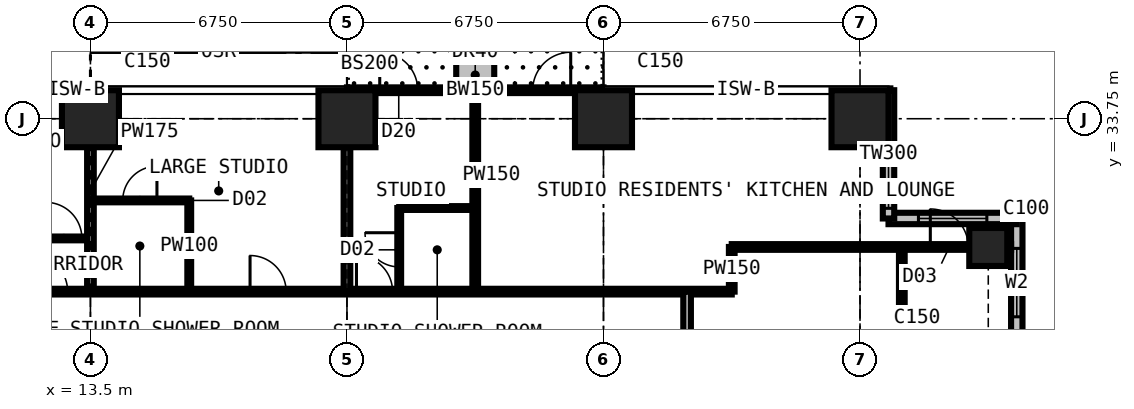
"""IFC4 building model, lengths in metres.
Left out: names, types, materials, properties, quantities, classifications, styles, units other than length and angle.
Written with IfcOpenShell. Run it as: python <this file> out.ifc"""

import sys

from ifc_helpers import new_model, si_unit, direction, frame, frame_2d, origin, origin_2d, place, context, subcontext, project, spatial, rectangle, extrude, element, fill, save


model = new_model("IFC4")
c1 = context("Model", 3, precision=1e-05, world=origin(), true_north=direction((0.0, 1.0)))
c2 = subcontext(c1, "Body", "Model", "MODEL_VIEW")
j1 = project(units=[si_unit("LENGTHUNIT", "METRE"), si_unit("PLANEANGLEUNIT", "RADIAN")], contexts=[c1])
p1 = place(None, origin())
s1 = spatial("IfcSite", under=j1, at=p1, CompositionType="ELEMENT")
p2 = place(p1, origin())
s2 = spatial("IfcBuilding", under=s1, at=p2, CompositionType="ELEMENT")
p3 = place(p2, frame((0.0, 0.0, 126.9)))
s3 = spatial("IfcBuildingStorey", under=s2, at=p3, CompositionType="ELEMENT", Elevation=126.9)
for number, where, z_axis, x_axis in (
    (1, (13.5, 33.75, 0.0), (0.0, 0.0, 1.0), (1.0, 0.0, 0.0)),
    (2, (20.25, 33.75, 0.0), (0.0, 0.0, 1.0), (1.0, 0.0, 0.0)),
    (3, (27.0, 33.75, 0.0), (0.0, 0.0, 1.0), (1.0, 0.0, 0.0)),
    (4, (33.75, 33.75, 0.0), (0.0, 0.0, 1.0), (1.0, 0.0, 0.0)),
):
    element("IfcColumn", number, at=place(p3, frame(where, z_axis=z_axis, x_axis=x_axis)), inside=s3, PredefinedType="COLUMN", context=c2, shape_type="SweptSolid", body=[
        extrude(rectangle(XDim=1.5, YDim=1.5, at=origin_2d()), origin(), (0.0, 0.0, 1.0), 3.6),
    ])
p4 = place(p3, frame((37.125, 30.375, 0.0), z_axis=(0.0, 0.0, 1.0), x_axis=(1.0, 0.0, 0.0)))
e5 = element("IfcColumn", 5, at=p4, inside=s3, PredefinedType="COLUMN", context=c2, shape_type="SweptSolid", body=[
    extrude(rectangle(XDim=1.0, YDim=1.0, at=origin_2d()), origin(), (0.0, 0.0, 1.0), 3.6),
])
p5 = place(p3, frame((37.875, 27.75, 0.0), z_axis=(0.0, 0.0, 1.0), x_axis=(0.0, 1.0, 0.0)))
e6 = element("IfcWall", 6, at=p5, inside=s3, PredefinedType="SOLIDWALL", context=c2, shape_type="SweptSolid", body=[
    extrude(rectangle(XDim=3.375, YDim=0.3, at=frame_2d((1.688, 0.0))), origin(), (0.0, 0.0, 1.0), 3.375),
])
p6 = place(p5, frame((0.788, 0.0, 0.6)))
e7 = element("IfcOpeningElement", 7, at=p6, cuts=e6, PredefinedType="OPENING", context=c2, shape_type="SweptSolid", body=[
    extrude(rectangle(XDim=1.8, YDim=2.1, at=frame_2d((0.9, 1.05))), frame((0.0, 0.16, 0.0), z_axis=(0.0, -1.0, 0.0), x_axis=(1.0, 0.0, 0.0)), (0.0, 0.0, 1.0), 0.32),
])
p7 = place(p3, frame((37.875, 31.125, 0.0), z_axis=(0.0, 0.0, 1.0), x_axis=(-1.0, 0.0, 0.0)))
e8 = element("IfcWall", 8, at=p7, inside=s3, PredefinedType="SOLIDWALL", context=c2, shape_type="SweptSolid", body=[
    extrude(rectangle(XDim=3.375, YDim=0.3, at=frame_2d((1.688, 0.0))), origin(), (0.0, 0.0, 1.0), 3.375),
])
p8 = place(p7, frame((0.788, 0.0, 0.6)))
e9 = element("IfcOpeningElement", 9, at=p8, cuts=e8, PredefinedType="OPENING", context=c2, shape_type="SweptSolid", body=[
    extrude(rectangle(XDim=1.8, YDim=2.1, at=frame_2d((0.9, 1.05))), frame((0.0, 0.16, 0.0), z_axis=(0.0, -1.0, 0.0), x_axis=(1.0, 0.0, 0.0)), (0.0, 0.0, 1.0), 0.32),
])
p9 = place(p3, frame((34.5, 31.125, 0.0), z_axis=(0.0, 0.0, 1.0), x_axis=(0.0, 1.0, 0.0)))
e10 = element("IfcWall", 10, at=p9, inside=s3, PredefinedType="SOLIDWALL", context=c2, shape_type="SweptSolid", body=[
    extrude(rectangle(XDim=3.375, YDim=0.3, at=frame_2d((1.688, 0.0))), origin(), (0.0, 0.0, 1.0), 3.375),
])
p10 = place(p9, frame((0.268, 0.0, 0.9)))
e11 = element("IfcOpeningElement", 11, at=p10, cuts=e10, PredefinedType="OPENING", context=c2, shape_type="SweptSolid", body=[
    extrude(rectangle(XDim=1.5, YDim=1.8, at=frame_2d((0.75, 0.9))), frame((0.0, 0.16, 0.0), z_axis=(0.0, -1.0, 0.0), x_axis=(1.0, 0.0, 0.0)), (0.0, 0.0, 1.0), 0.32),
])
p11 = place(p3, frame((20.25, 34.5, 0.0), z_axis=(0.0, 0.0, 1.0), x_axis=(1.0, 0.0, 0.0)))
e12 = element("IfcWall", 12, at=p11, inside=s3, PredefinedType="SOLIDWALL", context=c2, shape_type="SweptSolid", body=[
    extrude(rectangle(XDim=6.75, YDim=0.15, at=frame_2d((3.375, 0.0))), origin(), (0.0, 0.0, 1.0), 3.375),
])
p12 = place(p11, frame((0.863, 0.0, 0.0)))
e13 = element("IfcOpeningElement", 13, at=p12, cuts=e12, PredefinedType="OPENING", context=c2, shape_type="SweptSolid", body=[
    extrude(rectangle(XDim=1.0, YDim=2.2, at=frame_2d((0.5, 1.1))), frame((0.0, 0.085, 0.0), z_axis=(0.0, -1.0, 0.0), x_axis=(1.0, 0.0, 0.0)), (0.0, 0.0, 1.0), 0.17),
])
p13 = place(p11, frame((1.975, 0.0, 0.9)))
e14 = element("IfcOpeningElement", 14, at=p13, cuts=e12, PredefinedType="OPENING", context=c2, shape_type="SweptSolid", body=[
    extrude(rectangle(XDim=1.2, YDim=1.8, at=frame_2d((0.6, 0.9))), frame((0.0, 0.085, 0.0), z_axis=(0.0, -1.0, 0.0), x_axis=(1.0, 0.0, 0.0)), (0.0, 0.0, 1.0), 0.17),
])
p14 = place(p11, frame((4.887, 0.0, 0.0)))
e15 = element("IfcOpeningElement", 15, at=p14, cuts=e12, PredefinedType="OPENING", context=c2, shape_type="SweptSolid", body=[
    extrude(rectangle(XDim=1.0, YDim=2.2, at=frame_2d((0.5, 1.1))), frame((0.0, 0.085, 0.0), z_axis=(0.0, -1.0, 0.0), x_axis=(1.0, 0.0, 0.0)), (0.0, 0.0, 1.0), 0.17),
])
p15 = place(p11, frame((3.575, 0.0, 0.9)))
e16 = element("IfcOpeningElement", 16, at=p15, cuts=e12, PredefinedType="OPENING", context=c2, shape_type="SweptSolid", body=[
    extrude(rectangle(XDim=1.2, YDim=1.8, at=frame_2d((0.6, 0.9))), frame((0.0, 0.085, 0.0), z_axis=(0.0, -1.0, 0.0), x_axis=(1.0, 0.0, 0.0)), (0.0, 0.0, 1.0), 0.17),
])
p16 = place(p3, frame((23.625, 34.6, 0.0), z_axis=(0.0, 0.0, 1.0), x_axis=(0.0, 1.0, 0.0)))
e17 = element("IfcWall", 17, at=p16, inside=s3, PredefinedType="USERDEFINED", context=c2, shape_type="SweptSolid", body=[
    extrude(rectangle(XDim=2.2, YDim=1.0, at=frame_2d((1.1, 0.0))), origin(), (0.0, 0.0, 1.0), 0.9),
])
p17 = place(p3, frame((10.125, 30.6, 0.0), z_axis=(0.0, 0.0, 1.0), x_axis=(1.0, 0.0, 0.0)))
e18 = element("IfcWall", 18, at=p17, inside=s3, PredefinedType="PARTITIONING", context=c2, shape_type="SweptSolid", body=[
    extrude(rectangle(XDim=3.375, YDim=0.1, at=frame_2d((1.688, 0.0))), origin(), (0.0, 0.0, 1.0), 3.375),
])
p18 = place(p17, frame((2.2, 0.0, 0.0)))
e19 = element("IfcOpeningElement", 19, at=p18, cuts=e18, PredefinedType="OPENING", context=c2, shape_type="SweptSolid", body=[
    extrude(rectangle(XDim=0.95, YDim=2.2, at=frame_2d((0.475, 1.1))), frame((0.0, 0.06, 0.0), z_axis=(0.0, -1.0, 0.0), x_axis=(1.0, 0.0, 0.0)), (0.0, 0.0, 1.0), 0.12),
])
p19 = place(p3, frame((11.3, 29.2, 0.0), z_axis=(0.0, 0.0, 1.0), x_axis=(1.0, 0.0, 0.0)))
e20 = element("IfcWall", 20, at=p19, inside=s3, PredefinedType="PARTITIONING", context=c2, shape_type="SweptSolid", body=[
    extrude(rectangle(XDim=19.075, YDim=0.15, at=frame_2d((9.538, 0.0))), origin(), (0.0, 0.0, 1.0), 3.375),
])
p20 = place(p19, frame((6.4, 0.0, 0.0)))
e21 = element("IfcOpeningElement", 21, at=p20, cuts=e20, PredefinedType="OPENING", context=c2, shape_type="SweptSolid", body=[
    extrude(rectangle(XDim=0.95, YDim=2.2, at=frame_2d((0.475, 1.1))), frame((0.0, 0.085, 0.0), z_axis=(0.0, -1.0, 0.0), x_axis=(1.0, 0.0, 0.0)), (0.0, 0.0, 1.0), 0.17),
])
p21 = place(p19, frame((9.2, 0.0, 0.0)))
e22 = element("IfcOpeningElement", 22, at=p21, cuts=e20, PredefinedType="OPENING", context=c2, shape_type="SweptSolid", body=[
    extrude(rectangle(XDim=0.95, YDim=2.2, at=frame_2d((0.475, 1.1))), frame((0.0, 0.085, 0.0), z_axis=(0.0, -1.0, 0.0), x_axis=(1.0, 0.0, 0.0)), (0.0, 0.0, 1.0), 0.17),
])
p22 = place(p19, frame((0.6, 0.0, 0.0)))
e23 = element("IfcOpeningElement", 23, at=p22, cuts=e20, PredefinedType="OPENING", context=c2, shape_type="SweptSolid", body=[
    extrude(rectangle(XDim=1.0, YDim=2.2, at=frame_2d((0.5, 1.1))), frame((0.0, 0.085, 0.0), z_axis=(0.0, -1.0, 0.0), x_axis=(1.0, 0.0, 0.0)), (0.0, 0.0, 1.0), 0.17),
])
p23 = place(p3, frame((13.5, 29.2, 0.0), z_axis=(0.0, 0.0, 1.0), x_axis=(0.0, 1.0, 0.0)))
e24 = element("IfcWall", 24, at=p23, inside=s3, PredefinedType="PARTITIONING", context=c2, shape_type="SweptSolid", body=[
    extrude(rectangle(XDim=5.284, YDim=0.175, at=frame_2d((2.642, 0.0))), origin(), (0.0, 0.0, 1.0), 2.61),
])
p24 = place(p3, frame((13.5, 31.6, 0.0), z_axis=(0.0, 0.0, 1.0), x_axis=(1.0, 0.0, 0.0)))
e25 = element("IfcWall", 25, at=p24, inside=s3, PredefinedType="PARTITIONING", context=c2, shape_type="SweptSolid", body=[
    extrude(rectangle(XDim=2.6, YDim=0.1, at=frame_2d((1.3, 0.0))), origin(), (0.0, 0.0, 1.0), 3.375),
])
p25 = place(p24, frame((0.85, 0.0, 0.0)))
e26 = element("IfcOpeningElement", 26, at=p25, cuts=e25, PredefinedType="OPENING", context=c2, shape_type="SweptSolid", body=[
    extrude(rectangle(XDim=0.9, YDim=2.2, at=frame_2d((0.45, 1.1))), frame((0.0, 0.06, 0.0), z_axis=(0.0, -1.0, 0.0), x_axis=(1.0, 0.0, 0.0)), (0.0, 0.0, 1.0), 0.12),
])
p26 = place(p3, frame((16.1, 29.2, 0.0), z_axis=(0.0, 0.0, 1.0), x_axis=(0.0, 1.0, 0.0)))
e27 = element("IfcWall", 27, at=p26, inside=s3, PredefinedType="PARTITIONING", context=c2, shape_type="SweptSolid", body=[
    extrude(rectangle(XDim=2.4, YDim=0.1, at=frame_2d((1.2, 0.0))), origin(), (0.0, 0.0, 1.0), 3.375),
])
p27 = place(p3, frame((20.25, 29.2, 0.0), z_axis=(0.0, 0.0, 1.0), x_axis=(0.0, 1.0, 0.0)))
e28 = element("IfcWall", 28, at=p27, inside=s3, PredefinedType="PARTITIONING", context=c2, shape_type="SweptSolid", body=[
    extrude(rectangle(XDim=5.284, YDim=0.175, at=frame_2d((2.642, 0.0))), origin(), (0.0, 0.0, 1.0), 2.61),
])
p28 = place(p3, frame((21.625, 29.2, 0.0), z_axis=(0.0, 0.0, 1.0), x_axis=(0.0, 1.0, 0.0)))
e29 = element("IfcWall", 29, at=p28, inside=s3, PredefinedType="PARTITIONING", context=c2, shape_type="SweptSolid", body=[
    extrude(rectangle(XDim=2.2, YDim=0.1, at=frame_2d((1.1, 0.0))), origin(), (0.0, 0.0, 1.0), 3.375),
])
p29 = place(p28, frame((0.65, 0.0, 0.0)))
e30 = element("IfcOpeningElement", 30, at=p29, cuts=e29, PredefinedType="OPENING", context=c2, shape_type="SweptSolid", body=[
    extrude(rectangle(XDim=0.9, YDim=2.2, at=frame_2d((0.45, 1.1))), frame((0.0, 0.06, 0.0), z_axis=(0.0, -1.0, 0.0), x_axis=(1.0, 0.0, 0.0)), (0.0, 0.0, 1.0), 0.12),
])
p30 = place(p3, frame((21.625, 31.4, 0.0), z_axis=(0.0, 0.0, 1.0), x_axis=(1.0, 0.0, 0.0)))
e31 = element("IfcWall", 31, at=p30, inside=s3, PredefinedType="PARTITIONING", context=c2, shape_type="SweptSolid", body=[
    extrude(rectangle(XDim=2.0, YDim=0.1, at=frame_2d((1.0, 0.0))), origin(), (0.0, 0.0, 1.0), 3.375),
])
p31 = place(p3, frame((23.625, 29.2, 0.0), z_axis=(0.0, 0.0, 1.0), x_axis=(0.0, 1.0, 0.0)))
e32 = element("IfcWall", 32, at=p31, inside=s3, PredefinedType="PARTITIONING", context=c2, shape_type="SweptSolid", body=[
    extrude(rectangle(XDim=5.284, YDim=0.15, at=frame_2d((2.642, 0.0))), origin(), (0.0, 0.0, 1.0), 3.375),
])
p32 = place(p3, frame((29.2, 11.3, 0.0), z_axis=(0.0, 0.0, 1.0), x_axis=(0.0, 1.0, 0.0)))
e33 = element("IfcWall", 33, at=p32, inside=s3, PredefinedType="PARTITIONING", context=c2, shape_type="SweptSolid", body=[
    extrude(rectangle(XDim=17.9, YDim=0.2, at=frame_2d((8.95, 0.0))), origin(), (0.0, 0.0, 1.0), 3.375),
])
p33 = place(p32, frame((8.35, 0.0, 0.0)))
e34 = element("IfcOpeningElement", 34, at=p33, cuts=e33, PredefinedType="OPENING", context=c2, shape_type="SweptSolid", body=[
    extrude(rectangle(XDim=1.2, YDim=2.2, at=frame_2d((0.6, 1.1))), frame((0.0, 0.11, 0.0), z_axis=(0.0, -1.0, 0.0), x_axis=(1.0, 0.0, 0.0)), (0.0, 0.0, 1.0), 0.22),
])
p34 = place(p3, frame((30.375, 29.2, 0.0), z_axis=(0.0, 0.0, 1.0), x_axis=(0.0, 1.0, 0.0)))
e35 = element("IfcWall", 35, at=p34, inside=s3, PredefinedType="PARTITIONING", context=c2, shape_type="SweptSolid", body=[
    extrude(rectangle(XDim=1.175, YDim=0.15, at=frame_2d((0.587, 0.0))), origin(), (0.0, 0.0, 1.0), 3.375),
])
p35 = place(p3, frame((30.375, 30.375, 0.0), z_axis=(0.0, 0.0, 1.0), x_axis=(1.0, 0.0, 0.0)))
e36 = element("IfcWall", 36, at=p35, inside=s3, PredefinedType="PARTITIONING", context=c2, shape_type="SweptSolid", body=[
    extrude(rectangle(XDim=7.35, YDim=0.15, at=frame_2d((3.675, 0.0))), origin(), (0.0, 0.0, 1.0), 2.877),
])
p36 = place(p35, frame((5.225, 0.0, 0.0)))
e37 = element("IfcOpeningElement", 37, at=p36, cuts=e36, PredefinedType="OPENING", context=c2, shape_type="SweptSolid", body=[
    extrude(rectangle(XDim=1.0, YDim=2.2, at=frame_2d((0.5, 1.1))), frame((0.0, 0.085, 0.0), z_axis=(0.0, -1.0, 0.0), x_axis=(1.0, 0.0, 0.0)), (0.0, 0.0, 1.0), 0.17),
])
p37 = place(p3, frame((34.85, 12.55, 0.0), z_axis=(0.0, 0.0, 1.0), x_axis=(0.0, 1.0, 0.0)))
e38 = element("IfcWall", 38, at=p37, inside=s3, PredefinedType="PARTITIONING", context=c2, shape_type="SweptSolid", body=[
    extrude(rectangle(XDim=17.825, YDim=0.15, at=frame_2d((8.913, 0.0))), origin(), (0.0, 0.0, 1.0), 3.375),
])
p38 = place(p37, frame((8.5, 0.0, 0.0)))
e39 = element("IfcOpeningElement", 39, at=p38, cuts=e38, PredefinedType="OPENING", context=c2, shape_type="SweptSolid", body=[
    extrude(rectangle(XDim=0.95, YDim=2.2, at=frame_2d((0.475, 1.1))), frame((0.0, 0.085, 0.0), z_axis=(0.0, -1.0, 0.0), x_axis=(1.0, 0.0, 0.0)), (0.0, 0.0, 1.0), 0.17),
])
p39 = place(p6, origin())
e40 = element("IfcWindow", 40, at=p39, inside=s3, PartitioningType="SINGLE_PANEL", PredefinedType="WINDOW", context=c2, shape_type="SweptSolid", body=[
    extrude(rectangle(XDim=1.8, YDim=2.1, at=frame_2d((0.9, 1.05))), frame((0.0, 0.03, 0.0), z_axis=(0.0, -1.0, 0.0), x_axis=(1.0, 0.0, 0.0)), (0.0, 0.0, 1.0), 0.06),
])
fill(e7, e40)
p40 = place(p8, origin())
e41 = element("IfcWindow", 41, at=p40, inside=s3, PartitioningType="SINGLE_PANEL", PredefinedType="WINDOW", context=c2, shape_type="SweptSolid", body=[
    extrude(rectangle(XDim=1.8, YDim=2.1, at=frame_2d((0.9, 1.05))), frame((0.0, 0.03, 0.0), z_axis=(0.0, -1.0, 0.0), x_axis=(1.0, 0.0, 0.0)), (0.0, 0.0, 1.0), 0.06),
])
fill(e9, e41)
p41 = place(p10, origin())
e42 = element("IfcWindow", 42, at=p41, inside=s3, PartitioningType="SINGLE_PANEL", PredefinedType="WINDOW", context=c2, shape_type="SweptSolid", body=[
    extrude(rectangle(XDim=1.5, YDim=1.8, at=frame_2d((0.75, 0.9))), frame((0.0, 0.03, 0.0), z_axis=(0.0, -1.0, 0.0), x_axis=(1.0, 0.0, 0.0)), (0.0, 0.0, 1.0), 0.06),
])
fill(e11, e42)
p42 = place(p12, origin())
e43 = element("IfcDoor", 43, at=p42, inside=s3, OperationType="SINGLE_SWING_LEFT", PredefinedType="DOOR", context=c2, shape_type="SweptSolid", body=[
    extrude(rectangle(XDim=1.0, YDim=2.2, at=frame_2d((0.5, 1.1))), frame((0.0, 0.025, 0.0), z_axis=(0.0, -1.0, 0.0), x_axis=(1.0, 0.0, 0.0)), (0.0, 0.0, 1.0), 0.05),
])
fill(e13, e43)
p43 = place(p13, origin())
e44 = element("IfcWindow", 44, at=p43, inside=s3, PartitioningType="SINGLE_PANEL", PredefinedType="WINDOW", context=c2, shape_type="SweptSolid", body=[
    extrude(rectangle(XDim=1.2, YDim=1.8, at=frame_2d((0.6, 0.9))), frame((0.0, 0.03, 0.0), z_axis=(0.0, -1.0, 0.0), x_axis=(1.0, 0.0, 0.0)), (0.0, 0.0, 1.0), 0.06),
])
fill(e14, e44)
p44 = place(p14, origin())
e45 = element("IfcDoor", 45, at=p44, inside=s3, OperationType="SINGLE_SWING_RIGHT", PredefinedType="DOOR", context=c2, shape_type="SweptSolid", body=[
    extrude(rectangle(XDim=1.0, YDim=2.2, at=frame_2d((0.5, 1.1))), frame((0.0, 0.025, 0.0), z_axis=(0.0, -1.0, 0.0), x_axis=(1.0, 0.0, 0.0)), (0.0, 0.0, 1.0), 0.05),
])
fill(e15, e45)
p45 = place(p15, origin())
e46 = element("IfcWindow", 46, at=p45, inside=s3, PartitioningType="SINGLE_PANEL", PredefinedType="WINDOW", context=c2, shape_type="SweptSolid", body=[
    extrude(rectangle(XDim=1.2, YDim=1.8, at=frame_2d((0.6, 0.9))), frame((0.0, 0.03, 0.0), z_axis=(0.0, -1.0, 0.0), x_axis=(1.0, 0.0, 0.0)), (0.0, 0.0, 1.0), 0.06),
])
fill(e16, e46)
p46 = place(p36, origin())
e47 = element("IfcDoor", 47, at=p46, inside=s3, OperationType="SINGLE_SWING_LEFT", PredefinedType="DOOR", context=c2, shape_type="SweptSolid", body=[
    extrude(rectangle(XDim=1.0, YDim=2.2, at=frame_2d((0.5, 1.1))), frame((0.0, 0.025, 0.0), z_axis=(0.0, -1.0, 0.0), x_axis=(1.0, 0.0, 0.0)), (0.0, 0.0, 1.0), 0.05),
])
fill(e37, e47)
p47 = place(p20, origin())
e48 = element("IfcDoor", 48, at=p47, inside=s3, OperationType="SINGLE_SWING_LEFT", PredefinedType="DOOR", context=c2, shape_type="SweptSolid", body=[
    extrude(rectangle(XDim=0.95, YDim=2.2, at=frame_2d((0.475, 1.1))), frame((0.0, 0.025, 0.0), z_axis=(0.0, -1.0, 0.0), x_axis=(1.0, 0.0, 0.0)), (0.0, 0.0, 1.0), 0.05),
])
fill(e21, e48)
p48 = place(p25, origin())
e49 = element("IfcDoor", 49, at=p48, inside=s3, OperationType="SINGLE_SWING_RIGHT", PredefinedType="DOOR", context=c2, shape_type="SweptSolid", body=[
    extrude(rectangle(XDim=0.9, YDim=2.2, at=frame_2d((0.45, 1.1))), frame((0.0, 0.025, 0.0), z_axis=(0.0, -1.0, 0.0), x_axis=(1.0, 0.0, 0.0)), (0.0, 0.0, 1.0), 0.05),
])
fill(e26, e49)
p49 = place(p18, origin())
e50 = element("IfcDoor", 50, at=p49, inside=s3, OperationType="SINGLE_SWING_LEFT", PredefinedType="DOOR", context=c2, shape_type="SweptSolid", body=[
    extrude(rectangle(XDim=0.95, YDim=2.2, at=frame_2d((0.475, 1.1))), frame((0.0, 0.025, 0.0), z_axis=(0.0, -1.0, 0.0), x_axis=(1.0, 0.0, 0.0)), (0.0, 0.0, 1.0), 0.05),
])
fill(e19, e50)
p50 = place(p21, origin())
e51 = element("IfcDoor", 51, at=p50, inside=s3, OperationType="SINGLE_SWING_LEFT", PredefinedType="DOOR", context=c2, shape_type="SweptSolid", body=[
    extrude(rectangle(XDim=0.95, YDim=2.2, at=frame_2d((0.475, 1.1))), frame((0.0, 0.025, 0.0), z_axis=(0.0, -1.0, 0.0), x_axis=(1.0, 0.0, 0.0)), (0.0, 0.0, 1.0), 0.05),
])
fill(e22, e51)
p51 = place(p29, origin())
e52 = element("IfcDoor", 52, at=p51, inside=s3, OperationType="SINGLE_SWING_RIGHT", PredefinedType="DOOR", context=c2, shape_type="SweptSolid", body=[
    extrude(rectangle(XDim=0.9, YDim=2.2, at=frame_2d((0.45, 1.1))), frame((0.0, 0.025, 0.0), z_axis=(0.0, -1.0, 0.0), x_axis=(1.0, 0.0, 0.0)), (0.0, 0.0, 1.0), 0.05),
])
fill(e30, e52)
p52 = place(p22, origin())
e53 = element("IfcDoor", 53, at=p52, inside=s3, OperationType="SINGLE_SWING_LEFT", PredefinedType="DOOR", context=c2, shape_type="SweptSolid", body=[
    extrude(rectangle(XDim=1.0, YDim=2.2, at=frame_2d((0.5, 1.1))), frame((0.0, 0.025, 0.0), z_axis=(0.0, -1.0, 0.0), x_axis=(1.0, 0.0, 0.0)), (0.0, 0.0, 1.0), 0.05),
])
fill(e23, e53)
save(model, sys.argv[1])
